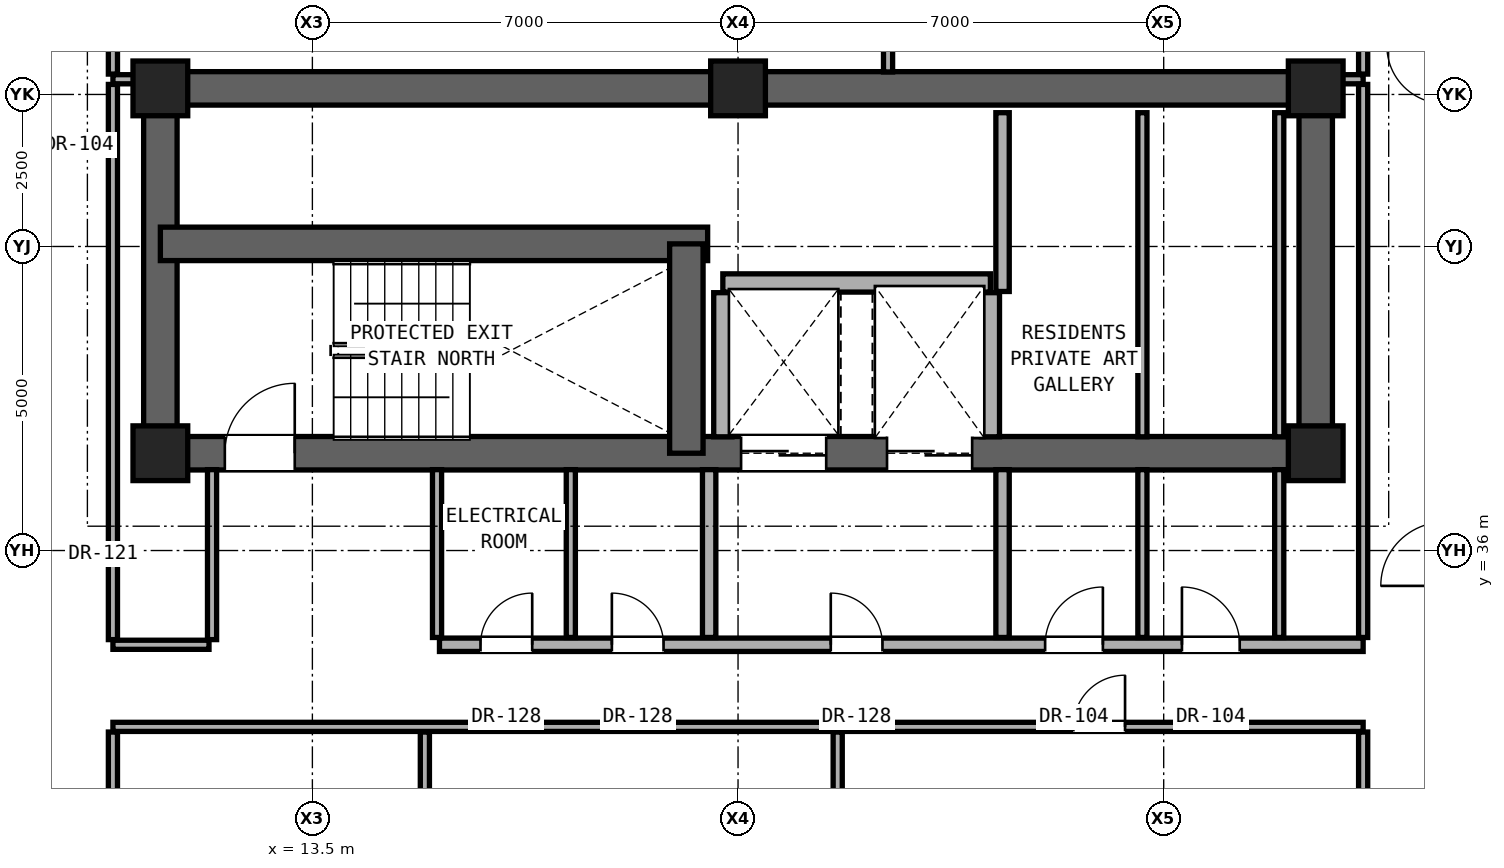
"""IFC4 building model, lengths in metres.
Left out: names, types, materials, properties, quantities, classifications, styles, units other than length and angle.
Written with IfcOpenShell. Run it as: python <this file> out.ifc"""

import sys

from ifc_helpers import new_model, si_unit, direction, frame, frame_2d, origin, origin_2d, place, context, subcontext, project, spatial, rectangle, extrude, element, fill, save


model = new_model("IFC4")
c1 = context("Model", 3, precision=1e-05, world=origin(), true_north=direction((0.0, 1.0)))
c2 = subcontext(c1, "Body", "Model", "MODEL_VIEW")
j1 = project(units=[si_unit("LENGTHUNIT", "METRE"), si_unit("PLANEANGLEUNIT", "RADIAN")], contexts=[c1])
p1 = place(None, origin())
s1 = spatial("IfcSite", under=j1, at=p1, CompositionType="ELEMENT")
p2 = place(p1, origin())
s2 = spatial("IfcBuilding", under=s1, at=p2, CompositionType="ELEMENT")
p3 = place(p2, frame((0.0, 0.0, 196.65)))
s3 = spatial("IfcBuildingStorey", under=s2, at=p3, CompositionType="ELEMENT", Elevation=196.65)
for number, where, z_axis, x_axis in (
    (1, (11.0, 37.6, 0.0), (0.0, 0.0, 1.0), (1.0, 0.0, 0.0)),
    (2, (30.0, 37.6, 0.0), (0.0, 0.0, 1.0), (1.0, 0.0, 0.0)),
    (3, (11.0, 43.6, 0.0), (0.0, 0.0, 1.0), (1.0, 0.0, 0.0)),
    (4, (20.5, 43.6, 0.0), (0.0, 0.0, 1.0), (1.0, 0.0, 0.0)),
    (5, (30.0, 43.6, 0.0), (0.0, 0.0, 1.0), (1.0, 0.0, 0.0)),
):
    element("IfcColumn", number, at=place(p3, frame(where, z_axis=z_axis, x_axis=x_axis)), inside=s3, PredefinedType="COLUMN", context=c2, shape_type="SweptSolid", body=[
        extrude(rectangle(XDim=0.9, YDim=0.9, at=origin_2d()), origin(), (0.0, 0.0, 1.0), 3.25),
    ])
p4 = place(p3, frame((11.0, 43.6, 0.0), z_axis=(0.0, 0.0, 1.0), x_axis=(1.0, 0.0, 0.0)))
e6 = element("IfcWall", 6, at=p4, inside=s3, PredefinedType="SHEAR", context=c2, shape_type="SweptSolid", body=[
    extrude(rectangle(XDim=19.0, YDim=0.55, at=frame_2d((9.5, 0.0))), origin(), (0.0, 0.0, 1.0), 3.05),
])
for number, where, z_axis, x_axis in (
    (7, (11.0, 37.6, 0.0), (0.0, 0.0, 1.0), (0.0, 1.0, 0.0)),
    (8, (30.0, 37.6, 0.0), (0.0, 0.0, 1.0), (0.0, 1.0, 0.0)),
):
    element("IfcWall", number, at=place(p3, frame(where, z_axis=z_axis, x_axis=x_axis)), inside=s3, PredefinedType="SHEAR", context=c2, shape_type="SweptSolid", body=[
        extrude(rectangle(XDim=6.0, YDim=0.55, at=frame_2d((3.0, 0.0))), origin(), (0.0, 0.0, 1.0), 3.05),
    ])
p5 = place(p3, frame((11.0, 37.6, 0.0), z_axis=(0.0, 0.0, 1.0), x_axis=(1.0, 0.0, 0.0)))
e9 = element("IfcWall", 9, at=p5, inside=s3, PredefinedType="SHEAR", context=c2, shape_type="SweptSolid", body=[
    extrude(rectangle(XDim=19.0, YDim=0.55, at=frame_2d((9.5, 0.0))), origin(), (0.0, 0.0, 1.0), 3.05),
])
p6 = place(p5, frame((1.06, 0.0, 0.0)))
e10 = element("IfcOpeningElement", 10, at=p6, cuts=e9, PredefinedType="OPENING", context=c2, shape_type="SweptSolid", body=[
    extrude(rectangle(XDim=1.15, YDim=2.2, at=frame_2d((0.575, 1.1))), frame((0.0, 0.285, 0.0), z_axis=(0.0, -1.0, 0.0), x_axis=(1.0, 0.0, 0.0)), (0.0, 0.0, 1.0), 0.57),
])
p7 = place(p5, frame((9.55, 0.0, 0.0)))
e11 = element("IfcOpeningElement", 11, at=p7, cuts=e9, PredefinedType="OPENING", context=c2, shape_type="SweptSolid", body=[
    extrude(rectangle(XDim=1.4, YDim=2.35, at=frame_2d((0.7, 1.175))), frame((0.0, 0.285, 0.0), z_axis=(0.0, -1.0, 0.0), x_axis=(1.0, 0.0, 0.0)), (0.0, 0.0, 1.0), 0.57),
])
p8 = place(p5, frame((11.95, 0.0, 0.0)))
e12 = element("IfcOpeningElement", 12, at=p8, cuts=e9, PredefinedType="OPENING", context=c2, shape_type="SweptSolid", body=[
    extrude(rectangle(XDim=1.4, YDim=2.35, at=frame_2d((0.7, 1.175))), frame((0.0, 0.285, 0.0), z_axis=(0.0, -1.0, 0.0), x_axis=(1.0, 0.0, 0.0)), (0.0, 0.0, 1.0), 0.57),
])
p9 = place(p3, frame((11.0, 41.043, 0.0), z_axis=(0.0, 0.0, 1.0), x_axis=(1.0, 0.0, 0.0)))
e13 = element("IfcWall", 13, at=p9, inside=s3, PredefinedType="SHEAR", context=c2, shape_type="SweptSolid", body=[
    extrude(rectangle(XDim=9.0, YDim=0.55, at=frame_2d((4.5, 0.0))), origin(), (0.0, 0.0, 1.0), 3.05),
])
p10 = place(p3, frame((19.65, 37.6, 0.0), z_axis=(0.0, 0.0, 1.0), x_axis=(0.0, 1.0, 0.0)))
e14 = element("IfcWall", 14, at=p10, inside=s3, PredefinedType="SHEAR", context=c2, shape_type="SweptSolid", body=[
    extrude(rectangle(XDim=3.443, YDim=0.55, at=frame_2d((1.721, 0.0))), origin(), (0.0, 0.0, 1.0), 3.05),
])
p11 = place(p3, frame((10.22, 33.1, 0.0), z_axis=(0.0, 0.0, 1.0), x_axis=(1.0, 0.0, 0.0)))
e15 = element("IfcWall", 15, at=p11, inside=s3, PredefinedType="PARTITIONING", context=c2, shape_type="SweptSolid", body=[
    extrude(rectangle(XDim=20.56, YDim=0.15, at=frame_2d((10.28, 0.0))), origin(), (0.0, 0.0, 1.0), 2.186),
])
p12 = place(p11, frame((15.794, 0.0, 0.0)))
e16 = element("IfcOpeningElement", 16, at=p12, cuts=e15, PredefinedType="OPENING", context=c2, shape_type="SweptSolid", body=[
    extrude(rectangle(XDim=0.85, YDim=2.01, at=frame_2d((0.425, 1.005))), frame((0.0, 0.085, 0.0), z_axis=(0.0, -1.0, 0.0), x_axis=(1.0, 0.0, 0.0)), (0.0, 0.0, 1.0), 0.17),
])
p13 = place(p3, frame((10.22, 34.45, 0.0), z_axis=(0.0, 0.0, 1.0), x_axis=(1.0, 0.0, 0.0)))
e17 = element("IfcWall", 17, at=p13, inside=s3, PredefinedType="PARTITIONING", context=c2, shape_type="SweptSolid", body=[
    extrude(rectangle(XDim=1.58, YDim=0.15, at=frame_2d((0.79, 0.0))), origin(), (0.0, 0.0, 1.0), 2.186),
])
p14 = place(p3, frame((15.59, 34.45, 0.0), z_axis=(0.0, 0.0, 1.0), x_axis=(1.0, 0.0, 0.0)))
e18 = element("IfcWall", 18, at=p14, inside=s3, PredefinedType="SOLIDWALL", context=c2, shape_type="SweptSolid", body=[
    extrude(rectangle(XDim=15.19, YDim=0.22, at=frame_2d((7.595, 0.0))), origin(), (0.0, 0.0, 1.0), 2.186),
])
p15 = place(p14, frame((6.435, 0.0, 0.0)))
e19 = element("IfcOpeningElement", 19, at=p15, cuts=e18, PredefinedType="OPENING", context=c2, shape_type="SweptSolid", body=[
    extrude(rectangle(XDim=0.85, YDim=2.01, at=frame_2d((0.425, 1.005))), frame((0.0, 0.12, 0.0), z_axis=(0.0, -1.0, 0.0), x_axis=(1.0, 0.0, 0.0)), (0.0, 0.0, 1.0), 0.24),
])
p16 = place(p14, frame((9.96, 0.0, 0.0)))
e20 = element("IfcOpeningElement", 20, at=p16, cuts=e18, PredefinedType="OPENING", context=c2, shape_type="SweptSolid", body=[
    extrude(rectangle(XDim=0.95, YDim=2.15, at=frame_2d((0.475, 1.075))), frame((0.0, 0.12, 0.0), z_axis=(0.0, -1.0, 0.0), x_axis=(1.0, 0.0, 0.0)), (0.0, 0.0, 1.0), 0.24),
])
p17 = place(p14, frame((12.21, 0.0, 0.0)))
e21 = element("IfcOpeningElement", 21, at=p17, cuts=e18, PredefinedType="OPENING", context=c2, shape_type="SweptSolid", body=[
    extrude(rectangle(XDim=0.95, YDim=2.15, at=frame_2d((0.475, 1.075))), frame((0.0, 0.12, 0.0), z_axis=(0.0, -1.0, 0.0), x_axis=(1.0, 0.0, 0.0)), (0.0, 0.0, 1.0), 0.24),
])
p18 = place(p14, frame((0.675, 0.0, 0.0)))
e22 = element("IfcOpeningElement", 22, at=p18, cuts=e18, PredefinedType="OPENING", context=c2, shape_type="SweptSolid", body=[
    extrude(rectangle(XDim=0.85, YDim=2.01, at=frame_2d((0.425, 1.005))), frame((0.0, 0.12, 0.0), z_axis=(0.0, -1.0, 0.0), x_axis=(1.0, 0.0, 0.0)), (0.0, 0.0, 1.0), 0.24),
])
p19 = place(p14, frame((2.835, 0.0, 0.0)))
e23 = element("IfcOpeningElement", 23, at=p19, cuts=e18, PredefinedType="OPENING", context=c2, shape_type="SweptSolid", body=[
    extrude(rectangle(XDim=0.85, YDim=2.01, at=frame_2d((0.425, 1.005))), frame((0.0, 0.12, 0.0), z_axis=(0.0, -1.0, 0.0), x_axis=(1.0, 0.0, 0.0)), (0.0, 0.0, 1.0), 0.24),
])
p20 = place(p3, frame((20.25, 40.4, 0.0), z_axis=(0.0, 0.0, 1.0), x_axis=(1.0, 0.0, 0.0)))
e24 = element("IfcWall", 24, at=p20, inside=s3, PredefinedType="SOLIDWALL", context=c2, shape_type="SweptSolid", body=[
    extrude(rectangle(XDim=4.4, YDim=0.3, at=frame_2d((2.2, 0.0))), origin(), (0.0, 0.0, 1.0), 3.05),
])
for number, where, z_axis, x_axis in (
    (25, (10.22, 43.75, 0.0), (0.0, 0.0, 1.0), (1.0, 0.0, 0.0)),
    (26, (30.27, 43.75, 0.0), (0.0, 0.0, 1.0), (1.0, 0.0, 0.0)),
):
    element("IfcWall", number, at=place(p3, frame(where, z_axis=z_axis, x_axis=x_axis)), inside=s3, PredefinedType="PARTITIONING", context=c2, shape_type="SweptSolid", body=[
        extrude(rectangle(XDim=0.51, YDim=0.15, at=frame_2d((0.255, 0.0))), origin(), (0.0, 0.0, 1.0), 3.05),
    ])
p21 = place(p3, frame((10.22, 22.935, 0.0), z_axis=(0.0, 0.0, 1.0), x_axis=(0.0, 1.0, 0.0)))
e27 = element("IfcWall", 27, at=p21, inside=s3, PredefinedType="PARTITIONING", context=c2, shape_type="SweptSolid", body=[
    extrude(rectangle(XDim=10.08, YDim=0.15, at=frame_2d((5.04, 0.0))), origin(), (0.0, 0.0, 1.0), 2.346),
])
p22 = place(p21, frame((4.565, 0.0, 0.0)))
e28 = element("IfcOpeningElement", 28, at=p22, cuts=e27, PredefinedType="OPENING", context=c2, shape_type="SweptSolid", body=[
    extrude(rectangle(XDim=0.95, YDim=2.15, at=frame_2d((0.475, 1.075))), frame((0.0, 0.085, 0.0), z_axis=(0.0, -1.0, 0.0), x_axis=(1.0, 0.0, 0.0)), (0.0, 0.0, 1.0), 0.17),
])
p23 = place(p3, frame((10.22, 34.535, 0.0), z_axis=(0.0, 0.0, 1.0), x_axis=(0.0, 1.0, 0.0)))
e29 = element("IfcWall", 29, at=p23, inside=s3, PredefinedType="PARTITIONING", context=c2, shape_type="SweptSolid", body=[
    extrude(rectangle(XDim=9.13, YDim=0.15, at=frame_2d((4.565, 0.0))), origin(), (0.0, 0.0, 1.0), 2.442),
])
p24 = place(p3, frame((10.22, 43.835, 0.0), z_axis=(0.0, 0.0, 1.0), x_axis=(0.0, 1.0, 0.0)))
e30 = element("IfcWall", 30, at=p24, inside=s3, PredefinedType="PARTITIONING", context=c2, shape_type="SweptSolid", body=[
    extrude(rectangle(XDim=2.547, YDim=0.15, at=frame_2d((1.273, 0.0))), origin(), (0.0, 0.0, 1.0), 3.05),
])
p25 = place(p24, frame((0.749, 0.0, 0.0)))
e31 = element("IfcOpeningElement", 31, at=p25, cuts=e30, PredefinedType="OPENING", context=c2, shape_type="SweptSolid", body=[
    extrude(rectangle(XDim=1.05, YDim=2.2, at=frame_2d((0.525, 1.1))), frame((0.0, 0.085, 0.0), z_axis=(0.0, -1.0, 0.0), x_axis=(1.0, 0.0, 0.0)), (0.0, 0.0, 1.0), 0.17),
])
p26 = place(p3, frame((11.85, 34.535, 0.0), z_axis=(0.0, 0.0, 1.0), x_axis=(0.0, 1.0, 0.0)))
e32 = element("IfcWall", 32, at=p26, inside=s3, PredefinedType="PARTITIONING", context=c2, shape_type="SweptSolid", body=[
    extrude(rectangle(XDim=2.795, YDim=0.15, at=frame_2d((1.397, 0.0))), origin(), (0.0, 0.0, 1.0), 3.05),
])
p27 = place(p3, frame((15.35, 22.935, 0.0), z_axis=(0.0, 0.0, 1.0), x_axis=(0.0, 1.0, 0.0)))
e33 = element("IfcWall", 33, at=p27, inside=s3, PredefinedType="PARTITIONING", context=c2, shape_type="SweptSolid", body=[
    extrude(rectangle(XDim=10.08, YDim=0.15, at=frame_2d((5.04, 0.0))), origin(), (0.0, 0.0, 1.0), 2.186),
])
for number, where, z_axis, x_axis in (
    (34, (15.55, 34.57, 0.0), (0.0, 0.0, 1.0), (0.0, 1.0, 0.0)),
    (35, (17.75, 34.57, 0.0), (0.0, 0.0, 1.0), (0.0, 1.0, 0.0)),
):
    element("IfcWall", number, at=place(p3, frame(where, z_axis=z_axis, x_axis=x_axis)), inside=s3, PredefinedType="PARTITIONING", context=c2, shape_type="SweptSolid", body=[
        extrude(rectangle(XDim=2.76, YDim=0.15, at=frame_2d((1.38, 0.0))), origin(), (0.0, 0.0, 1.0), 3.05),
    ])
p28 = place(p3, frame((20.025, 34.57, 0.0), z_axis=(0.0, 0.0, 1.0), x_axis=(0.0, 1.0, 0.0)))
e36 = element("IfcWall", 36, at=p28, inside=s3, PredefinedType="SOLIDWALL", context=c2, shape_type="SweptSolid", body=[
    extrude(rectangle(XDim=2.76, YDim=0.22, at=frame_2d((1.38, 0.0))), origin(), (0.0, 0.0, 1.0), 3.05),
])
p29 = place(p3, frame((20.25, 37.87, 0.0), z_axis=(0.0, 0.0, 1.0), x_axis=(0.0, 1.0, 0.0)))
e37 = element("IfcWall", 37, at=p29, inside=s3, PredefinedType="SOLIDWALL", context=c2, shape_type="SweptSolid", body=[
    extrude(rectangle(XDim=2.37, YDim=0.3, at=frame_2d((1.185, 0.0))), origin(), (0.0, 0.0, 1.0), 3.05),
])
p30 = place(p3, frame((22.139, 19.985, 0.0), z_axis=(0.0, 0.0, 1.0), x_axis=(0.0, 1.0, 0.0)))
e38 = element("IfcWall", 38, at=p30, inside=s3, PredefinedType="PARTITIONING", context=c2, shape_type="SweptSolid", body=[
    extrude(rectangle(XDim=13.03, YDim=0.15, at=frame_2d((6.515, 0.0))), origin(), (0.0, 0.0, 1.0), 2.186),
])
p31 = place(p3, frame((22.967, 43.87, 0.0), z_axis=(0.0, 0.0, 1.0), x_axis=(0.0, 1.0, 0.0)))
e39 = element("IfcWall", 39, at=p31, inside=s3, PredefinedType="PARTITIONING", context=c2, shape_type="SweptSolid", body=[
    extrude(rectangle(XDim=2.512, YDim=0.15, at=frame_2d((1.256, 0.0))), origin(), (0.0, 0.0, 1.0), 3.05),
])
p32 = place(p3, frame((24.65, 37.87, 0.0), z_axis=(0.0, 0.0, 1.0), x_axis=(0.0, 1.0, 0.0)))
e40 = element("IfcWall", 40, at=p32, inside=s3, PredefinedType="SOLIDWALL", context=c2, shape_type="SweptSolid", body=[
    extrude(rectangle(XDim=2.37, YDim=0.3, at=frame_2d((1.185, 0.0))), origin(), (0.0, 0.0, 1.0), 3.05),
])
p33 = place(p3, frame((24.85, 34.57, 0.0), z_axis=(0.0, 0.0, 1.0), x_axis=(0.0, 1.0, 0.0)))
e41 = element("IfcWall", 41, at=p33, inside=s3, PredefinedType="SOLIDWALL", context=c2, shape_type="SweptSolid", body=[
    extrude(rectangle(XDim=2.76, YDim=0.22, at=frame_2d((1.38, 0.0))), origin(), (0.0, 0.0, 1.0), 3.05),
])
p34 = place(p3, frame((24.85, 40.26, 0.0), z_axis=(0.0, 0.0, 1.0), x_axis=(0.0, 1.0, 0.0)))
e42 = element("IfcWall", 42, at=p34, inside=s3, PredefinedType="SOLIDWALL", context=c2, shape_type="SweptSolid", body=[
    extrude(rectangle(XDim=2.94, YDim=0.22, at=frame_2d((1.47, 0.0))), origin(), (0.0, 0.0, 1.0), 3.05),
])
p35 = place(p3, frame((27.15, 34.57, 0.0), z_axis=(0.0, 0.0, 1.0), x_axis=(0.0, 1.0, 0.0)))
e43 = element("IfcWall", 43, at=p35, inside=s3, PredefinedType="PARTITIONING", context=c2, shape_type="SweptSolid", body=[
    extrude(rectangle(XDim=2.76, YDim=0.15, at=frame_2d((1.38, 0.0))), origin(), (0.0, 0.0, 1.0), 3.05),
])
p36 = place(p3, frame((27.15, 37.87, 0.0), z_axis=(0.0, 0.0, 1.0), x_axis=(0.0, 1.0, 0.0)))
e44 = element("IfcWall", 44, at=p36, inside=s3, PredefinedType="PARTITIONING", context=c2, shape_type="SweptSolid", body=[
    extrude(rectangle(XDim=5.33, YDim=0.15, at=frame_2d((2.665, 0.0))), origin(), (0.0, 0.0, 1.0), 3.05),
])
p37 = place(p3, frame((29.4, 34.57, 0.0), z_axis=(0.0, 0.0, 1.0), x_axis=(0.0, 1.0, 0.0)))
e45 = element("IfcWall", 45, at=p37, inside=s3, PredefinedType="PARTITIONING", context=c2, shape_type="SweptSolid", body=[
    extrude(rectangle(XDim=2.76, YDim=0.15, at=frame_2d((1.38, 0.0))), origin(), (0.0, 0.0, 1.0), 3.05),
])
p38 = place(p3, frame((29.4, 37.87, 0.0), z_axis=(0.0, 0.0, 1.0), x_axis=(0.0, 1.0, 0.0)))
e46 = element("IfcWall", 46, at=p38, inside=s3, PredefinedType="PARTITIONING", context=c2, shape_type="SweptSolid", body=[
    extrude(rectangle(XDim=5.33, YDim=0.15, at=frame_2d((2.665, 0.0))), origin(), (0.0, 0.0, 1.0), 3.05),
])
p39 = place(p3, frame((30.78, 19.985, 0.0), z_axis=(0.0, 0.0, 1.0), x_axis=(0.0, 1.0, 0.0)))
e47 = element("IfcWall", 47, at=p39, inside=s3, PredefinedType="PARTITIONING", context=c2, shape_type="SweptSolid", body=[
    extrude(rectangle(XDim=13.03, YDim=0.15, at=frame_2d((6.515, 0.0))), origin(), (0.0, 0.0, 1.0), 2.346),
])
p40 = place(p3, frame((30.78, 34.57, 0.0), z_axis=(0.0, 0.0, 1.0), x_axis=(0.0, 1.0, 0.0)))
e48 = element("IfcWall", 48, at=p40, inside=s3, PredefinedType="PARTITIONING", context=c2, shape_type="SweptSolid", body=[
    extrude(rectangle(XDim=9.095, YDim=0.15, at=frame_2d((4.547, 0.0))), origin(), (0.0, 0.0, 1.0), 2.442),
])
p41 = place(p3, frame((30.78, 43.835, 0.0), z_axis=(0.0, 0.0, 1.0), x_axis=(0.0, 1.0, 0.0)))
e49 = element("IfcWall", 49, at=p41, inside=s3, PredefinedType="PARTITIONING", context=c2, shape_type="SweptSolid", body=[
    extrude(rectangle(XDim=2.547, YDim=0.15, at=frame_2d((1.273, 0.0))), origin(), (0.0, 0.0, 1.0), 3.05),
])
p42 = place(p41, frame((0.749, 0.0, 0.0)))
e50 = element("IfcOpeningElement", 50, at=p42, cuts=e49, PredefinedType="OPENING", context=c2, shape_type="SweptSolid", body=[
    extrude(rectangle(XDim=1.05, YDim=2.2, at=frame_2d((0.525, 1.1))), frame((0.0, 0.085, 0.0), z_axis=(0.0, -1.0, 0.0), x_axis=(1.0, 0.0, 0.0)), (0.0, 0.0, 1.0), 0.17),
])
p43 = place(p6, origin())
e51 = element("IfcDoor", 51, at=p43, inside=s3, OperationType="SINGLE_SWING_RIGHT", PredefinedType="DOOR", context=c2, shape_type="SweptSolid", body=[
    extrude(rectangle(XDim=1.15, YDim=2.2, at=frame_2d((0.575, 1.1))), frame((0.0, 0.025, 0.0), z_axis=(0.0, -1.0, 0.0), x_axis=(1.0, 0.0, 0.0)), (0.0, 0.0, 1.0), 0.05),
])
fill(e10, e51)
p44 = place(p15, origin())
e52 = element("IfcDoor", 52, at=p44, inside=s3, OperationType="SINGLE_SWING_LEFT", PredefinedType="DOOR", context=c2, shape_type="SweptSolid", body=[
    extrude(rectangle(XDim=0.85, YDim=2.01, at=frame_2d((0.425, 1.005))), frame((0.0, 0.025, 0.0), z_axis=(0.0, -1.0, 0.0), x_axis=(1.0, 0.0, 0.0)), (0.0, 0.0, 1.0), 0.05),
])
fill(e19, e52)
p45 = place(p16, origin())
e53 = element("IfcDoor", 53, at=p45, inside=s3, OperationType="SINGLE_SWING_RIGHT", PredefinedType="DOOR", context=c2, shape_type="SweptSolid", body=[
    extrude(rectangle(XDim=0.95, YDim=2.15, at=frame_2d((0.475, 1.075))), frame((0.0, 0.025, 0.0), z_axis=(0.0, -1.0, 0.0), x_axis=(1.0, 0.0, 0.0)), (0.0, 0.0, 1.0), 0.05),
])
fill(e20, e53)
p46 = place(p17, origin())
e54 = element("IfcDoor", 54, at=p46, inside=s3, OperationType="SINGLE_SWING_LEFT", PredefinedType="DOOR", context=c2, shape_type="SweptSolid", body=[
    extrude(rectangle(XDim=0.95, YDim=2.15, at=frame_2d((0.475, 1.075))), frame((0.0, 0.025, 0.0), z_axis=(0.0, -1.0, 0.0), x_axis=(1.0, 0.0, 0.0)), (0.0, 0.0, 1.0), 0.05),
])
fill(e21, e54)
p47 = place(p18, origin())
e55 = element("IfcDoor", 55, at=p47, inside=s3, OperationType="SINGLE_SWING_RIGHT", PredefinedType="DOOR", context=c2, shape_type="SweptSolid", body=[
    extrude(rectangle(XDim=0.85, YDim=2.01, at=frame_2d((0.425, 1.005))), frame((0.0, 0.025, 0.0), z_axis=(0.0, -1.0, 0.0), x_axis=(1.0, 0.0, 0.0)), (0.0, 0.0, 1.0), 0.05),
])
fill(e22, e55)
p48 = place(p19, origin())
e56 = element("IfcDoor", 56, at=p48, inside=s3, OperationType="SINGLE_SWING_LEFT", PredefinedType="DOOR", context=c2, shape_type="SweptSolid", body=[
    extrude(rectangle(XDim=0.85, YDim=2.01, at=frame_2d((0.425, 1.005))), frame((0.0, 0.025, 0.0), z_axis=(0.0, -1.0, 0.0), x_axis=(1.0, 0.0, 0.0)), (0.0, 0.0, 1.0), 0.05),
])
fill(e23, e56)
p49 = place(p12, origin())
e57 = element("IfcDoor", 57, at=p49, inside=s3, OperationType="SINGLE_SWING_RIGHT", PredefinedType="DOOR", context=c2, shape_type="SweptSolid", body=[
    extrude(rectangle(XDim=0.85, YDim=2.01, at=frame_2d((0.425, 1.005))), frame((0.0, 0.025, 0.0), z_axis=(0.0, -1.0, 0.0), x_axis=(1.0, 0.0, 0.0)), (0.0, 0.0, 1.0), 0.05),
])
fill(e16, e57)
p50 = place(p7, origin())
e58 = element("IfcDoor", 58, at=p50, inside=s3, OperationType="DOUBLE_DOOR_SLIDING", PredefinedType="DOOR", context=c2, shape_type="SweptSolid", body=[
    extrude(rectangle(XDim=1.4, YDim=2.35, at=frame_2d((0.7, 1.175))), frame((0.0, 0.025, 0.0), z_axis=(0.0, -1.0, 0.0), x_axis=(1.0, 0.0, 0.0)), (0.0, 0.0, 1.0), 0.05),
])
fill(e11, e58)
p51 = place(p8, origin())
e59 = element("IfcDoor", 59, at=p51, inside=s3, OperationType="DOUBLE_DOOR_SLIDING", PredefinedType="DOOR", context=c2, shape_type="SweptSolid", body=[
    extrude(rectangle(XDim=1.4, YDim=2.35, at=frame_2d((0.7, 1.175))), frame((0.0, 0.025, 0.0), z_axis=(0.0, -1.0, 0.0), x_axis=(1.0, 0.0, 0.0)), (0.0, 0.0, 1.0), 0.05),
])
fill(e12, e59)
save(model, sys.argv[1])
